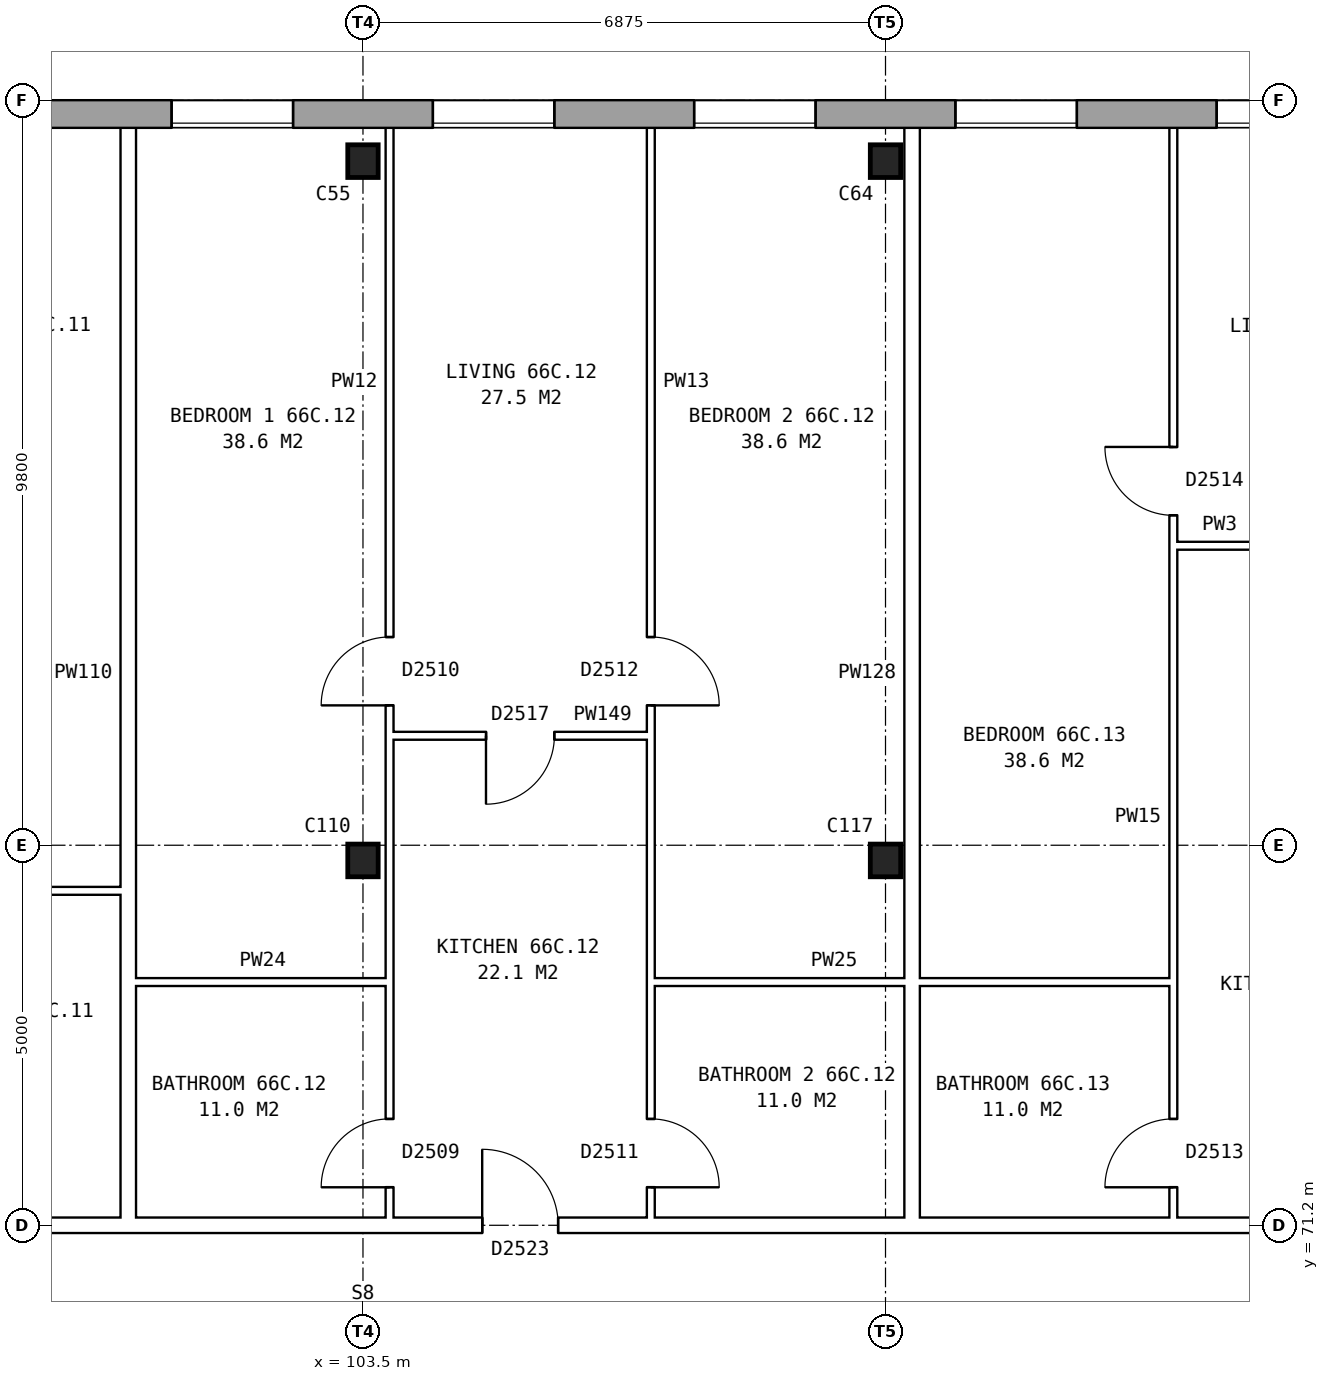
"""IFC4 building model, lengths in metres.
Left out: names, types, materials, properties, quantities, classifications, styles, units other than length and angle.
Written with IfcOpenShell. Run it as: python <this file> out.ifc"""

import sys

from ifc_helpers import new_model, si_unit, direction, frame, frame_2d, origin, origin_2d, place, context, subcontext, project, spatial, rectangle, i_section, extrude, element, fill, save


model = new_model("IFC4")
c1 = context("Model", 3, precision=1e-05, world=origin(), true_north=direction((0.0, 1.0)))
c2 = subcontext(c1, "Body", "Model", "MODEL_VIEW")
j1 = project(units=[si_unit("LENGTHUNIT", "METRE"), si_unit("PLANEANGLEUNIT", "RADIAN")], contexts=[c1])
p1 = place(None, origin())
s1 = spatial("IfcSite", under=j1, at=p1, CompositionType="ELEMENT")
p2 = place(p1, origin())
s2 = spatial("IfcBuilding", under=s1, at=p2, CompositionType="ELEMENT")
p3 = place(p2, frame((0.0, 0.0, 233.8)))
s3 = spatial("IfcBuildingStorey", under=s2, at=p3, CompositionType="ELEMENT", Elevation=233.8)
for number, where, z_axis, x_axis in (
    (1, (103.5, 76.0, 0.0), (0.0, 0.0, 1.0), (1.0, 0.0, 0.0)),
    (2, (110.375, 76.0, 0.0), (0.0, 0.0, 1.0), (1.0, 0.0, 0.0)),
    (3, (103.5, 85.2, 0.0), (0.0, 0.0, 1.0), (1.0, 0.0, 0.0)),
    (4, (110.375, 85.2, 0.0), (0.0, 0.0, 1.0), (1.0, 0.0, 0.0)),
):
    element("IfcColumn", number, at=place(p3, frame(where, z_axis=z_axis, x_axis=x_axis)), inside=s3, PredefinedType="COLUMN", context=c2, shape_type="SweptSolid", body=[
        extrude(i_section(OverallWidth=0.4, OverallDepth=0.43, WebThickness=0.028, FlangeThickness=0.04, at=origin_2d()), origin(), (0.0, 0.0, 1.0), 2.85),
    ])
p4 = place(p3, frame((131.05, 85.82, 0.0), z_axis=(0.0, 0.0, 1.0), x_axis=(-1.0, 0.0, 0.0)))
e5 = element("IfcWall", 5, at=p4, inside=s3, PredefinedType="STANDARD", context=c2, shape_type="SweptSolid", body=[
    extrude(rectangle(XDim=55.1, YDim=0.36, at=frame_2d((27.55, 0.0))), origin(), (0.0, 0.0, 1.0), 2.85),
])
p5 = place(p4, frame((0.969, 0.0, 0.8)))
e6 = element("IfcOpeningElement", 6, at=p5, cuts=e5, PredefinedType="OPENING", context=c2, shape_type="SweptSolid", body=[
    extrude(rectangle(XDim=1.6, YDim=1.8, at=frame_2d((0.8, 0.9))), frame((0.0, 0.19, 0.0), z_axis=(0.0, -1.0, 0.0), x_axis=(1.0, 0.0, 0.0)), (0.0, 0.0, 1.0), 0.38),
])
p6 = place(p4, frame((4.406, 0.0, 0.8)))
e7 = element("IfcOpeningElement", 7, at=p6, cuts=e5, PredefinedType="OPENING", context=c2, shape_type="SweptSolid", body=[
    extrude(rectangle(XDim=1.6, YDim=1.8, at=frame_2d((0.8, 0.9))), frame((0.0, 0.19, 0.0), z_axis=(0.0, -1.0, 0.0), x_axis=(1.0, 0.0, 0.0)), (0.0, 0.0, 1.0), 0.38),
])
p7 = place(p4, frame((7.844, 0.0, 0.8)))
e8 = element("IfcOpeningElement", 8, at=p7, cuts=e5, PredefinedType="OPENING", context=c2, shape_type="SweptSolid", body=[
    extrude(rectangle(XDim=1.6, YDim=1.8, at=frame_2d((0.8, 0.9))), frame((0.0, 0.19, 0.0), z_axis=(0.0, -1.0, 0.0), x_axis=(1.0, 0.0, 0.0)), (0.0, 0.0, 1.0), 0.38),
])
p8 = place(p4, frame((11.281, 0.0, 0.8)))
e9 = element("IfcOpeningElement", 9, at=p8, cuts=e5, PredefinedType="OPENING", context=c2, shape_type="SweptSolid", body=[
    extrude(rectangle(XDim=1.6, YDim=1.8, at=frame_2d((0.8, 0.9))), frame((0.0, 0.19, 0.0), z_axis=(0.0, -1.0, 0.0), x_axis=(1.0, 0.0, 0.0)), (0.0, 0.0, 1.0), 0.38),
])
p9 = place(p4, frame((14.719, 0.0, 0.8)))
e10 = element("IfcOpeningElement", 10, at=p9, cuts=e5, PredefinedType="OPENING", context=c2, shape_type="SweptSolid", body=[
    extrude(rectangle(XDim=1.6, YDim=1.8, at=frame_2d((0.8, 0.9))), frame((0.0, 0.19, 0.0), z_axis=(0.0, -1.0, 0.0), x_axis=(1.0, 0.0, 0.0)), (0.0, 0.0, 1.0), 0.38),
])
p10 = place(p4, frame((18.156, 0.0, 0.8)))
e11 = element("IfcOpeningElement", 11, at=p10, cuts=e5, PredefinedType="OPENING", context=c2, shape_type="SweptSolid", body=[
    extrude(rectangle(XDim=1.6, YDim=1.8, at=frame_2d((0.8, 0.9))), frame((0.0, 0.19, 0.0), z_axis=(0.0, -1.0, 0.0), x_axis=(1.0, 0.0, 0.0)), (0.0, 0.0, 1.0), 0.38),
])
p11 = place(p4, frame((21.594, 0.0, 0.8)))
e12 = element("IfcOpeningElement", 12, at=p11, cuts=e5, PredefinedType="OPENING", context=c2, shape_type="SweptSolid", body=[
    extrude(rectangle(XDim=1.6, YDim=1.8, at=frame_2d((0.8, 0.9))), frame((0.0, 0.19, 0.0), z_axis=(0.0, -1.0, 0.0), x_axis=(1.0, 0.0, 0.0)), (0.0, 0.0, 1.0), 0.38),
])
p12 = place(p4, frame((25.031, 0.0, 0.8)))
e13 = element("IfcOpeningElement", 13, at=p12, cuts=e5, PredefinedType="OPENING", context=c2, shape_type="SweptSolid", body=[
    extrude(rectangle(XDim=1.6, YDim=1.8, at=frame_2d((0.8, 0.9))), frame((0.0, 0.19, 0.0), z_axis=(0.0, -1.0, 0.0), x_axis=(1.0, 0.0, 0.0)), (0.0, 0.0, 1.0), 0.38),
])
p13 = place(p4, frame((28.469, 0.0, 0.8)))
e14 = element("IfcOpeningElement", 14, at=p13, cuts=e5, PredefinedType="OPENING", context=c2, shape_type="SweptSolid", body=[
    extrude(rectangle(XDim=1.6, YDim=1.8, at=frame_2d((0.8, 0.9))), frame((0.0, 0.19, 0.0), z_axis=(0.0, -1.0, 0.0), x_axis=(1.0, 0.0, 0.0)), (0.0, 0.0, 1.0), 0.38),
])
p14 = place(p4, frame((31.906, 0.0, 0.8)))
e15 = element("IfcOpeningElement", 15, at=p14, cuts=e5, PredefinedType="OPENING", context=c2, shape_type="SweptSolid", body=[
    extrude(rectangle(XDim=1.6, YDim=1.8, at=frame_2d((0.8, 0.9))), frame((0.0, 0.19, 0.0), z_axis=(0.0, -1.0, 0.0), x_axis=(1.0, 0.0, 0.0)), (0.0, 0.0, 1.0), 0.38),
])
p15 = place(p4, frame((35.344, 0.0, 0.8)))
e16 = element("IfcOpeningElement", 16, at=p15, cuts=e5, PredefinedType="OPENING", context=c2, shape_type="SweptSolid", body=[
    extrude(rectangle(XDim=1.6, YDim=1.8, at=frame_2d((0.8, 0.9))), frame((0.0, 0.19, 0.0), z_axis=(0.0, -1.0, 0.0), x_axis=(1.0, 0.0, 0.0)), (0.0, 0.0, 1.0), 0.38),
])
p16 = place(p4, frame((38.781, 0.0, 0.8)))
e17 = element("IfcOpeningElement", 17, at=p16, cuts=e5, PredefinedType="OPENING", context=c2, shape_type="SweptSolid", body=[
    extrude(rectangle(XDim=1.6, YDim=1.8, at=frame_2d((0.8, 0.9))), frame((0.0, 0.19, 0.0), z_axis=(0.0, -1.0, 0.0), x_axis=(1.0, 0.0, 0.0)), (0.0, 0.0, 1.0), 0.38),
])
p17 = place(p4, frame((42.219, 0.0, 0.8)))
e18 = element("IfcOpeningElement", 18, at=p17, cuts=e5, PredefinedType="OPENING", context=c2, shape_type="SweptSolid", body=[
    extrude(rectangle(XDim=1.6, YDim=1.8, at=frame_2d((0.8, 0.9))), frame((0.0, 0.19, 0.0), z_axis=(0.0, -1.0, 0.0), x_axis=(1.0, 0.0, 0.0)), (0.0, 0.0, 1.0), 0.38),
])
p18 = place(p4, frame((45.656, 0.0, 0.8)))
e19 = element("IfcOpeningElement", 19, at=p18, cuts=e5, PredefinedType="OPENING", context=c2, shape_type="SweptSolid", body=[
    extrude(rectangle(XDim=1.6, YDim=1.8, at=frame_2d((0.8, 0.9))), frame((0.0, 0.19, 0.0), z_axis=(0.0, -1.0, 0.0), x_axis=(1.0, 0.0, 0.0)), (0.0, 0.0, 1.0), 0.38),
])
p19 = place(p4, frame((49.094, 0.0, 0.8)))
e20 = element("IfcOpeningElement", 20, at=p19, cuts=e5, PredefinedType="OPENING", context=c2, shape_type="SweptSolid", body=[
    extrude(rectangle(XDim=1.6, YDim=1.8, at=frame_2d((0.8, 0.9))), frame((0.0, 0.19, 0.0), z_axis=(0.0, -1.0, 0.0), x_axis=(1.0, 0.0, 0.0)), (0.0, 0.0, 1.0), 0.38),
])
p20 = place(p4, frame((52.531, 0.0, 0.8)))
e21 = element("IfcOpeningElement", 21, at=p20, cuts=e5, PredefinedType="OPENING", context=c2, shape_type="SweptSolid", body=[
    extrude(rectangle(XDim=1.6, YDim=1.8, at=frame_2d((0.8, 0.9))), frame((0.0, 0.19, 0.0), z_axis=(0.0, -1.0, 0.0), x_axis=(1.0, 0.0, 0.0)), (0.0, 0.0, 1.0), 0.38),
])
p21 = place(p3, frame((83.225, 71.2, 0.0), z_axis=(0.0, 0.0, 1.0), x_axis=(1.0, 0.0, 0.0)))
e22 = element("IfcWall", 22, at=p21, inside=s3, PredefinedType="PARTITIONING", context=c2, shape_type="SweptSolid", body=[
    extrude(rectangle(XDim=41.25, YDim=0.2, at=frame_2d((20.625, 0.0))), origin(), (0.0, 0.0, 1.0), 2.85),
])
p22 = place(p21, frame((11.531, 0.0, 0.0)))
e23 = element("IfcOpeningElement", 23, at=p22, cuts=e22, PredefinedType="OPENING", context=c2, shape_type="SweptSolid", body=[
    extrude(rectangle(XDim=1.0, YDim=2.1, at=frame_2d((0.5, 1.05))), frame((0.0, 0.11, 0.0), z_axis=(0.0, -1.0, 0.0), x_axis=(1.0, 0.0, 0.0)), (0.0, 0.0, 1.0), 0.22),
])
p23 = place(p21, frame((21.844, 0.0, 0.0)))
e24 = element("IfcOpeningElement", 24, at=p23, cuts=e22, PredefinedType="OPENING", context=c2, shape_type="SweptSolid", body=[
    extrude(rectangle(XDim=1.0, YDim=2.1, at=frame_2d((0.5, 1.05))), frame((0.0, 0.11, 0.0), z_axis=(0.0, -1.0, 0.0), x_axis=(1.0, 0.0, 0.0)), (0.0, 0.0, 1.0), 0.22),
])
p24 = place(p21, frame((32.156, 0.0, 0.0)))
e25 = element("IfcOpeningElement", 25, at=p24, cuts=e22, PredefinedType="OPENING", context=c2, shape_type="SweptSolid", body=[
    extrude(rectangle(XDim=1.0, YDim=2.1, at=frame_2d((0.5, 1.05))), frame((0.0, 0.11, 0.0), z_axis=(0.0, -1.0, 0.0), x_axis=(1.0, 0.0, 0.0)), (0.0, 0.0, 1.0), 0.22),
])
p25 = place(p3, frame((100.512, 74.4, 0.0), z_axis=(0.0, 0.0, 1.0), x_axis=(1.0, 0.0, 0.0)))
e26 = element("IfcWall", 26, at=p25, inside=s3, PredefinedType="PARTITIONING", context=c2, shape_type="SweptSolid", body=[
    extrude(rectangle(XDim=3.338, YDim=0.1, at=frame_2d((1.669, 0.0))), origin(), (0.0, 0.0, 1.0), 2.85),
])
p26 = place(p3, frame((107.287, 74.4, 0.0), z_axis=(0.0, 0.0, 1.0), x_axis=(1.0, 0.0, 0.0)))
e27 = element("IfcWall", 27, at=p26, inside=s3, PredefinedType="PARTITIONING", context=c2, shape_type="SweptSolid", body=[
    extrude(rectangle(XDim=6.875, YDim=0.1, at=frame_2d((3.438, 0.0))), origin(), (0.0, 0.0, 1.0), 2.85),
])
p27 = place(p3, frame((96.975, 75.6, 0.0), z_axis=(0.0, 0.0, 1.0), x_axis=(1.0, 0.0, 0.0)))
e28 = element("IfcWall", 28, at=p27, inside=s3, PredefinedType="PARTITIONING", context=c2, shape_type="SweptSolid", body=[
    extrude(rectangle(XDim=3.337, YDim=0.1, at=frame_2d((1.668, 0.0))), origin(), (0.0, 0.0, 1.0), 2.85),
])
p28 = place(p3, frame((103.85, 77.64, 0.0), z_axis=(0.0, 0.0, 1.0), x_axis=(1.0, 0.0, 0.0)))
e29 = element("IfcWall", 29, at=p28, inside=s3, PredefinedType="PARTITIONING", context=c2, shape_type="SweptSolid", body=[
    extrude(rectangle(XDim=3.437, YDim=0.1, at=frame_2d((1.719, 0.0))), origin(), (0.0, 0.0, 1.0), 2.85),
])
p29 = place(p28, frame((1.269, 0.0, 0.0)))
e30 = element("IfcOpeningElement", 30, at=p29, cuts=e29, PredefinedType="OPENING", context=c2, shape_type="SweptSolid", body=[
    extrude(rectangle(XDim=0.9, YDim=2.1, at=frame_2d((0.45, 1.05))), frame((0.0, 0.06, 0.0), z_axis=(0.0, -1.0, 0.0), x_axis=(1.0, 0.0, 0.0)), (0.0, 0.0, 1.0), 0.12),
])
p30 = place(p3, frame((114.162, 80.14, 0.0), z_axis=(0.0, 0.0, 1.0), x_axis=(1.0, 0.0, 0.0)))
e31 = element("IfcWall", 31, at=p30, inside=s3, PredefinedType="PARTITIONING", context=c2, shape_type="SweptSolid", body=[
    extrude(rectangle(XDim=3.338, YDim=0.1, at=frame_2d((1.669, 0.0))), origin(), (0.0, 0.0, 1.0), 2.85),
])
p31 = place(p30, frame((1.219, 0.0, 0.0)))
e32 = element("IfcOpeningElement", 32, at=p31, cuts=e31, PredefinedType="OPENING", context=c2, shape_type="SweptSolid", body=[
    extrude(rectangle(XDim=0.9, YDim=2.1, at=frame_2d((0.45, 1.05))), frame((0.0, 0.06, 0.0), z_axis=(0.0, -1.0, 0.0), x_axis=(1.0, 0.0, 0.0)), (0.0, 0.0, 1.0), 0.12),
])
p32 = place(p3, frame((100.412, 71.3, 0.0), z_axis=(0.0, 0.0, 1.0), x_axis=(0.0, 1.0, 0.0)))
e33 = element("IfcWall", 33, at=p32, inside=s3, PredefinedType="PARTITIONING", context=c2, shape_type="SweptSolid", body=[
    extrude(rectangle(XDim=14.34, YDim=0.2, at=frame_2d((7.17, 0.0))), origin(), (0.0, 0.0, 1.0), 2.85),
])
p33 = place(p3, frame((103.85, 71.3, 0.0), z_axis=(0.0, 0.0, 1.0), x_axis=(0.0, 1.0, 0.0)))
e34 = element("IfcWall", 34, at=p33, inside=s3, PredefinedType="PARTITIONING", context=c2, shape_type="SweptSolid", body=[
    extrude(rectangle(XDim=14.34, YDim=0.1, at=frame_2d((7.17, 0.0))), origin(), (0.0, 0.0, 1.0), 2.85),
])
p34 = place(p33, frame((6.74, 0.0, 0.0)))
e35 = element("IfcOpeningElement", 35, at=p34, cuts=e34, PredefinedType="OPENING", context=c2, shape_type="SweptSolid", body=[
    extrude(rectangle(XDim=0.9, YDim=2.1, at=frame_2d((0.45, 1.05))), frame((0.0, 0.06, 0.0), z_axis=(0.0, -1.0, 0.0), x_axis=(1.0, 0.0, 0.0)), (0.0, 0.0, 1.0), 0.12),
])
p35 = place(p33, frame((0.4, 0.0, 0.0)))
e36 = element("IfcOpeningElement", 36, at=p35, cuts=e34, PredefinedType="OPENING", context=c2, shape_type="SweptSolid", body=[
    extrude(rectangle(XDim=0.9, YDim=2.1, at=frame_2d((0.45, 1.05))), frame((0.0, 0.06, 0.0), z_axis=(0.0, -1.0, 0.0), x_axis=(1.0, 0.0, 0.0)), (0.0, 0.0, 1.0), 0.12),
])
p36 = place(p3, frame((107.287, 71.3, 0.0), z_axis=(0.0, 0.0, 1.0), x_axis=(0.0, 1.0, 0.0)))
e37 = element("IfcWall", 37, at=p36, inside=s3, PredefinedType="PARTITIONING", context=c2, shape_type="SweptSolid", body=[
    extrude(rectangle(XDim=14.34, YDim=0.1, at=frame_2d((7.17, 0.0))), origin(), (0.0, 0.0, 1.0), 2.85),
])
p37 = place(p36, frame((6.74, 0.0, 0.0)))
e38 = element("IfcOpeningElement", 38, at=p37, cuts=e37, PredefinedType="OPENING", context=c2, shape_type="SweptSolid", body=[
    extrude(rectangle(XDim=0.9, YDim=2.1, at=frame_2d((0.45, 1.05))), frame((0.0, 0.06, 0.0), z_axis=(0.0, -1.0, 0.0), x_axis=(1.0, 0.0, 0.0)), (0.0, 0.0, 1.0), 0.12),
])
p38 = place(p36, frame((0.4, 0.0, 0.0)))
e39 = element("IfcOpeningElement", 39, at=p38, cuts=e37, PredefinedType="OPENING", context=c2, shape_type="SweptSolid", body=[
    extrude(rectangle(XDim=0.9, YDim=2.1, at=frame_2d((0.45, 1.05))), frame((0.0, 0.06, 0.0), z_axis=(0.0, -1.0, 0.0), x_axis=(1.0, 0.0, 0.0)), (0.0, 0.0, 1.0), 0.12),
])
p39 = place(p3, frame((110.725, 71.3, 0.0), z_axis=(0.0, 0.0, 1.0), x_axis=(0.0, 1.0, 0.0)))
e40 = element("IfcWall", 40, at=p39, inside=s3, PredefinedType="PARTITIONING", context=c2, shape_type="SweptSolid", body=[
    extrude(rectangle(XDim=14.34, YDim=0.2, at=frame_2d((7.17, 0.0))), origin(), (0.0, 0.0, 1.0), 2.85),
])
p40 = place(p3, frame((114.162, 71.3, 0.0), z_axis=(0.0, 0.0, 1.0), x_axis=(0.0, 1.0, 0.0)))
e41 = element("IfcWall", 41, at=p40, inside=s3, PredefinedType="PARTITIONING", context=c2, shape_type="SweptSolid", body=[
    extrude(rectangle(XDim=14.34, YDim=0.1, at=frame_2d((7.17, 0.0))), origin(), (0.0, 0.0, 1.0), 2.85),
])
p41 = place(p40, frame((9.24, 0.0, 0.0)))
e42 = element("IfcOpeningElement", 42, at=p41, cuts=e41, PredefinedType="OPENING", context=c2, shape_type="SweptSolid", body=[
    extrude(rectangle(XDim=0.9, YDim=2.1, at=frame_2d((0.45, 1.05))), frame((0.0, 0.06, 0.0), z_axis=(0.0, -1.0, 0.0), x_axis=(1.0, 0.0, 0.0)), (0.0, 0.0, 1.0), 0.12),
])
p42 = place(p40, frame((0.4, 0.0, 0.0)))
e43 = element("IfcOpeningElement", 43, at=p42, cuts=e41, PredefinedType="OPENING", context=c2, shape_type="SweptSolid", body=[
    extrude(rectangle(XDim=0.9, YDim=2.1, at=frame_2d((0.45, 1.05))), frame((0.0, 0.06, 0.0), z_axis=(0.0, -1.0, 0.0), x_axis=(1.0, 0.0, 0.0)), (0.0, 0.0, 1.0), 0.12),
])
p43 = place(p9, origin())
e44 = element("IfcWindow", 44, at=p43, inside=s3, PartitioningType="SINGLE_PANEL", PredefinedType="WINDOW", context=c2, shape_type="SweptSolid", body=[
    extrude(rectangle(XDim=1.6, YDim=1.8, at=frame_2d((0.8, 0.9))), frame((0.0, 0.15, 0.0), z_axis=(0.0, -1.0, 0.0), x_axis=(1.0, 0.0, 0.0)), (0.0, 0.0, 1.0), 0.06),
])
fill(e10, e44)
p44 = place(p10, origin())
e45 = element("IfcWindow", 45, at=p44, inside=s3, PartitioningType="SINGLE_PANEL", PredefinedType="WINDOW", context=c2, shape_type="SweptSolid", body=[
    extrude(rectangle(XDim=1.6, YDim=1.8, at=frame_2d((0.8, 0.9))), frame((0.0, 0.15, 0.0), z_axis=(0.0, -1.0, 0.0), x_axis=(1.0, 0.0, 0.0)), (0.0, 0.0, 1.0), 0.06),
])
fill(e11, e45)
p45 = place(p11, origin())
e46 = element("IfcWindow", 46, at=p45, inside=s3, PartitioningType="SINGLE_PANEL", PredefinedType="WINDOW", context=c2, shape_type="SweptSolid", body=[
    extrude(rectangle(XDim=1.6, YDim=1.8, at=frame_2d((0.8, 0.9))), frame((0.0, 0.15, 0.0), z_axis=(0.0, -1.0, 0.0), x_axis=(1.0, 0.0, 0.0)), (0.0, 0.0, 1.0), 0.06),
])
fill(e12, e46)
p46 = place(p12, origin())
e47 = element("IfcWindow", 47, at=p46, inside=s3, PartitioningType="SINGLE_PANEL", PredefinedType="WINDOW", context=c2, shape_type="SweptSolid", body=[
    extrude(rectangle(XDim=1.6, YDim=1.8, at=frame_2d((0.8, 0.9))), frame((0.0, 0.15, 0.0), z_axis=(0.0, -1.0, 0.0), x_axis=(1.0, 0.0, 0.0)), (0.0, 0.0, 1.0), 0.06),
])
fill(e13, e47)
p47 = place(p13, origin())
e48 = element("IfcWindow", 48, at=p47, inside=s3, PartitioningType="SINGLE_PANEL", PredefinedType="WINDOW", context=c2, shape_type="SweptSolid", body=[
    extrude(rectangle(XDim=1.6, YDim=1.8, at=frame_2d((0.8, 0.9))), frame((0.0, 0.15, 0.0), z_axis=(0.0, -1.0, 0.0), x_axis=(1.0, 0.0, 0.0)), (0.0, 0.0, 1.0), 0.06),
])
fill(e14, e48)
p48 = place(p34, origin())
e49 = element("IfcDoor", 49, at=p48, inside=s3, OperationType="SINGLE_SWING_LEFT", PredefinedType="DOOR", context=c2, shape_type="SweptSolid", body=[
    extrude(rectangle(XDim=0.9, YDim=2.1, at=frame_2d((0.45, 1.05))), frame((0.0, 0.025, 0.0), z_axis=(0.0, -1.0, 0.0), x_axis=(1.0, 0.0, 0.0)), (0.0, 0.0, 1.0), 0.05),
])
fill(e35, e49)
p49 = place(p37, frame((0.9, 0.0, 0.0), z_axis=(0.0, 0.0, 1.0), x_axis=(-1.0, 0.0, 0.0)))
e50 = element("IfcDoor", 50, at=p49, inside=s3, OperationType="SINGLE_SWING_RIGHT", PredefinedType="DOOR", context=c2, shape_type="SweptSolid", body=[
    extrude(rectangle(XDim=0.9, YDim=2.1, at=frame_2d((0.45, 1.05))), frame((0.0, 0.025, 0.0), z_axis=(0.0, -1.0, 0.0), x_axis=(1.0, 0.0, 0.0)), (0.0, 0.0, 1.0), 0.05),
])
fill(e38, e50)
p50 = place(p23, origin())
e51 = element("IfcDoor", 51, at=p50, inside=s3, OperationType="SINGLE_SWING_LEFT", PredefinedType="DOOR", context=c2, shape_type="SweptSolid", body=[
    extrude(rectangle(XDim=1.0, YDim=2.1, at=frame_2d((0.5, 1.05))), frame((0.0, 0.025, 0.0), z_axis=(0.0, -1.0, 0.0), x_axis=(1.0, 0.0, 0.0)), (0.0, 0.0, 1.0), 0.05),
])
fill(e24, e51)
p51 = place(p29, frame((0.9, 0.0, 0.0), z_axis=(0.0, 0.0, 1.0), x_axis=(-1.0, 0.0, 0.0)))
e52 = element("IfcDoor", 52, at=p51, inside=s3, OperationType="SINGLE_SWING_RIGHT", PredefinedType="DOOR", context=c2, shape_type="SweptSolid", body=[
    extrude(rectangle(XDim=0.9, YDim=2.1, at=frame_2d((0.45, 1.05))), frame((0.0, 0.025, 0.0), z_axis=(0.0, -1.0, 0.0), x_axis=(1.0, 0.0, 0.0)), (0.0, 0.0, 1.0), 0.05),
])
fill(e30, e52)
p52 = place(p35, origin())
e53 = element("IfcDoor", 53, at=p52, inside=s3, OperationType="SINGLE_SWING_LEFT", PredefinedType="DOOR", context=c2, shape_type="SweptSolid", body=[
    extrude(rectangle(XDim=0.9, YDim=2.1, at=frame_2d((0.45, 1.05))), frame((0.0, 0.025, 0.0), z_axis=(0.0, -1.0, 0.0), x_axis=(1.0, 0.0, 0.0)), (0.0, 0.0, 1.0), 0.05),
])
fill(e36, e53)
p53 = place(p38, frame((0.9, 0.0, 0.0), z_axis=(0.0, 0.0, 1.0), x_axis=(-1.0, 0.0, 0.0)))
e54 = element("IfcDoor", 54, at=p53, inside=s3, OperationType="SINGLE_SWING_RIGHT", PredefinedType="DOOR", context=c2, shape_type="SweptSolid", body=[
    extrude(rectangle(XDim=0.9, YDim=2.1, at=frame_2d((0.45, 1.05))), frame((0.0, 0.025, 0.0), z_axis=(0.0, -1.0, 0.0), x_axis=(1.0, 0.0, 0.0)), (0.0, 0.0, 1.0), 0.05),
])
fill(e39, e54)
p54 = place(p41, origin())
e55 = element("IfcDoor", 55, at=p54, inside=s3, OperationType="SINGLE_SWING_RIGHT", PredefinedType="DOOR", context=c2, shape_type="SweptSolid", body=[
    extrude(rectangle(XDim=0.9, YDim=2.1, at=frame_2d((0.45, 1.05))), frame((0.0, 0.025, 0.0), z_axis=(0.0, -1.0, 0.0), x_axis=(1.0, 0.0, 0.0)), (0.0, 0.0, 1.0), 0.05),
])
fill(e42, e55)
p55 = place(p42, origin())
e56 = element("IfcDoor", 56, at=p55, inside=s3, OperationType="SINGLE_SWING_LEFT", PredefinedType="DOOR", context=c2, shape_type="SweptSolid", body=[
    extrude(rectangle(XDim=0.9, YDim=2.1, at=frame_2d((0.45, 1.05))), frame((0.0, 0.025, 0.0), z_axis=(0.0, -1.0, 0.0), x_axis=(1.0, 0.0, 0.0)), (0.0, 0.0, 1.0), 0.05),
])
fill(e43, e56)
save(model, sys.argv[1])
